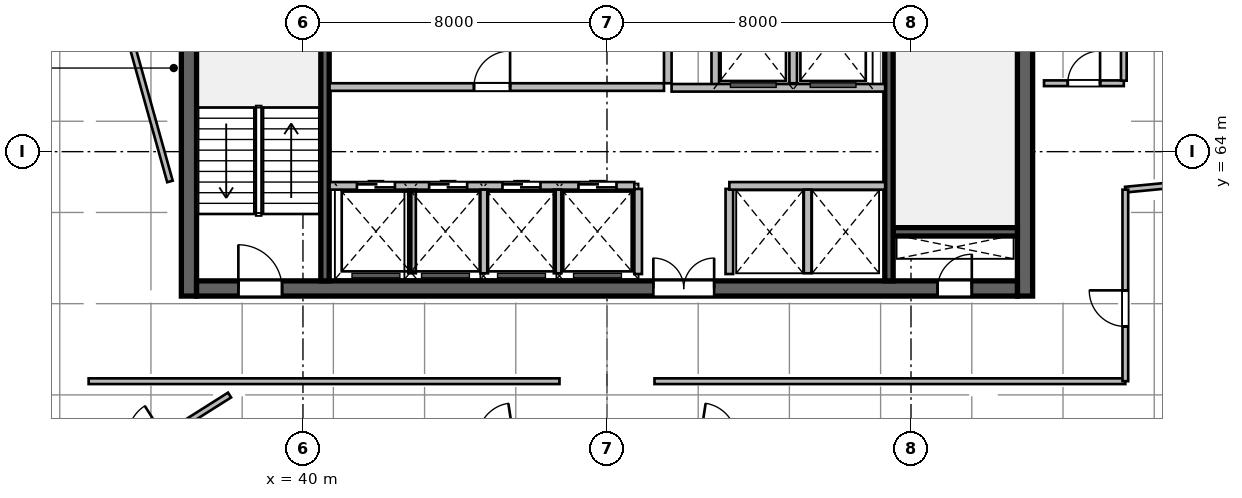
"""IFC4 building model, lengths in metres.
Left out: names, types, materials, properties, quantities, classifications, styles, units other than length and angle.
Written with IfcOpenShell. Run it as: python <this file> out.ifc"""

import sys

from ifc_helpers import new_model, si_unit, direction, frame, frame_2d, origin, place, context, subcontext, project, spatial, rectangle, extrude, source, transform, mapped, element, fill, save


model = new_model("IFC4")
c1 = context("Model", 3, precision=1e-05, world=origin(), true_north=direction((0.0, 1.0)))
c2 = subcontext(c1, "Body", "Model", "MODEL_VIEW")
j1 = project(units=[si_unit("LENGTHUNIT", "METRE"), si_unit("PLANEANGLEUNIT", "RADIAN")], contexts=[c1])
p1 = place(None, origin())
s1 = spatial("IfcSite", under=j1, at=p1, CompositionType="ELEMENT")
p2 = place(p1, origin())
s2 = spatial("IfcBuilding", under=s1, at=p2, CompositionType="ELEMENT")
p3 = place(p2, frame((0.0, 0.0, 275.7)))
s3 = spatial("IfcBuildingStorey", under=s2, at=p3, CompositionType="ELEMENT", Elevation=275.7)
m1 = source(origin(), c2, "Body", "SweptSolid", [
    extrude(rectangle(XDim=12.0, YDim=0.4, at=frame_2d((6.0, 0.0))), origin(), (0.0, 0.0, 1.0), 3.9),
])
for number, where, z_axis, x_axis in (
    (1, (37.0, 60.2, 0.0), (0.0, 0.0, 1.0), (0.0, 1.0, 0.0)),
    (2, (59.0, 60.2, 0.0), (0.0, 0.0, 1.0), (0.0, 1.0, 0.0)),
):
    element("IfcWall", number, at=place(p3, frame(where, z_axis=z_axis, x_axis=x_axis)), inside=s3, PredefinedType="SHEAR", context=c2, shape_type="MappedRepresentation", body=[
        mapped(m1, transform((0.0, 0.0, 0.0), scale=1.0)),
    ])
m2 = source(origin(), c2, "Body", "SweptSolid", [
    extrude(rectangle(XDim=21.6, YDim=0.4, at=frame_2d((10.8, 0.0))), origin(), (0.0, 0.0, 1.0), 3.9),
])
p4 = place(p3, frame((37.2, 60.4, 0.0), z_axis=(0.0, 0.0, 1.0), x_axis=(1.0, 0.0, 0.0)))
e3 = element("IfcWall", 3, at=p4, inside=s3, PredefinedType="SHEAR", context=c2, shape_type="MappedRepresentation", body=[
    mapped(m2, transform((0.0, 0.0, 0.0), scale=1.0)),
])
p5 = place(p4, frame((1.1, 0.0, 0.0)))
e4 = element("IfcOpeningElement", 4, at=p5, cuts=e3, PredefinedType="OPENING", context=c2, shape_type="SweptSolid", body=[
    extrude(rectangle(XDim=1.15, YDim=2.15, at=frame_2d((0.575, 1.075))), frame((0.0, 0.21, 0.0), z_axis=(0.0, -1.0, 0.0), x_axis=(1.0, 0.0, 0.0)), (0.0, 0.0, 1.0), 0.42),
])
p6 = place(p4, frame((19.5, 0.0, 0.0)))
e5 = element("IfcOpeningElement", 5, at=p6, cuts=e3, PredefinedType="OPENING", context=c2, shape_type="SweptSolid", body=[
    extrude(rectangle(XDim=0.9, YDim=2.1, at=frame_2d((0.45, 1.05))), frame((0.0, 0.21, 0.0), z_axis=(0.0, -1.0, 0.0), x_axis=(1.0, 0.0, 0.0)), (0.0, 0.0, 1.0), 0.42),
])
p7 = place(p4, frame((12.02, 0.0, 0.0)))
e6 = element("IfcOpeningElement", 6, at=p7, cuts=e3, PredefinedType="OPENING", context=c2, shape_type="SweptSolid", body=[
    extrude(rectangle(XDim=1.6, YDim=2.15, at=frame_2d((0.8, 1.075))), frame((0.0, 0.21, 0.0), z_axis=(0.0, -1.0, 0.0), x_axis=(1.0, 0.0, 0.0)), (0.0, 0.0, 1.0), 0.42),
])
m3 = source(origin(), c2, "Body", "SweptSolid", [
    extrude(rectangle(XDim=3.27, YDim=0.22, at=frame_2d((1.635, 0.0))), origin(), (0.0, 0.0, 1.0), 3.9),
])
p8 = place(p3, frame((55.53, 61.89, 0.0), z_axis=(0.0, 0.0, 1.0), x_axis=(1.0, 0.0, 0.0)))
e7 = element("IfcWall", 7, at=p8, inside=s3, PredefinedType="SHEAR", context=c2, shape_type="MappedRepresentation", body=[
    mapped(m3, transform((0.0, 0.0, 0.0), scale=1.0)),
])
m4 = source(origin(), c2, "Body", "SweptSolid", [
    extrude(rectangle(XDim=11.2, YDim=0.22, at=frame_2d((5.6, 0.0))), origin(), (0.0, 0.0, 1.0), 3.9),
])
p9 = place(p3, frame((40.58, 60.6, 0.0), z_axis=(0.0, 0.0, 1.0), x_axis=(0.0, 1.0, 0.0)))
e8 = element("IfcWall", 8, at=p9, inside=s3, PredefinedType="SHEAR", context=c2, shape_type="MappedRepresentation", body=[
    mapped(m4, transform((0.0, 0.0, 0.0), scale=1.0)),
])
p10 = place(p3, frame((55.42, 60.6, 0.0), z_axis=(0.0, 0.0, 1.0), x_axis=(0.0, 1.0, 0.0)))
e9 = element("IfcWall", 9, at=p10, inside=s3, PredefinedType="SHEAR", context=c2, shape_type="MappedRepresentation", body=[
    mapped(m4, transform((0.0, 0.0, 0.0), scale=1.0)),
])
p11 = place(p10, frame((9.645, 0.0, 0.0)))
e10 = element("IfcOpeningElement", 10, at=p11, cuts=e9, PredefinedType="OPENING", context=c2, shape_type="SweptSolid", body=[
    extrude(rectangle(XDim=1.15, YDim=2.15, at=frame_2d((0.575, 1.075))), frame((0.0, 0.12, 0.0), z_axis=(0.0, -1.0, 0.0), x_axis=(1.0, 0.0, 0.0)), (0.0, 0.0, 1.0), 0.24),
])
m5 = source(origin(), c2, "Body", "SweptSolid", [
    extrude(rectangle(XDim=2.24, YDim=0.2, at=frame_2d((1.12, 0.0))), origin(), (0.0, 0.0, 1.0), 3.64),
])
for number, where, z_axis, x_axis in (
    (11, (48.82, 60.78, 0.0), (0.0, 0.0, 1.0), (0.0, 1.0, 0.0)),
    (12, (51.22, 60.78, 0.0), (0.0, 0.0, 1.0), (0.0, 1.0, 0.0)),
):
    element("IfcWall", number, at=place(p3, frame(where, z_axis=z_axis, x_axis=x_axis)), inside=s3, PredefinedType="SOLIDWALL", context=c2, shape_type="MappedRepresentation", body=[
        mapped(m5, transform((0.0, 0.0, 0.0), scale=1.0)),
    ])
m6 = source(origin(), c2, "Body", "SweptSolid", [
    extrude(rectangle(XDim=5.8, YDim=0.2, at=frame_2d((2.9, 0.0))), origin(), (0.0, 0.0, 1.0), 3.64),
])
p12 = place(p3, frame((49.6, 65.8, 0.0), z_axis=(0.0, 0.0, 1.0), x_axis=(0.0, 1.0, 0.0)))
e13 = element("IfcWall", 13, at=p12, inside=s3, PredefinedType="SOLIDWALL", context=c2, shape_type="MappedRepresentation", body=[
    mapped(m6, transform((0.0, 0.0, 0.0), scale=1.0)),
])
m7 = source(origin(), c2, "Body", "SweptSolid", [
    extrude(rectangle(XDim=2.58, YDim=0.2, at=frame_2d((1.29, 0.0))), origin(), (0.0, 0.0, 1.0), 3.64),
])
p13 = place(p3, frame((50.85, 65.68, 0.0), z_axis=(0.0, 0.0, 1.0), x_axis=(0.0, 1.0, 0.0)))
e14 = element("IfcWall", 14, at=p13, inside=s3, PredefinedType="SOLIDWALL", context=c2, shape_type="MappedRepresentation", body=[
    mapped(m7, transform((0.0, 0.0, 0.0), scale=1.0)),
])
m8 = source(origin(), c2, "Body", "SweptSolid", [
    extrude(rectangle(XDim=2.4, YDim=0.2, at=frame_2d((1.2, 0.0))), origin(), (0.0, 0.0, 1.0), 3.64),
])
p14 = place(p3, frame((52.9, 65.8, 0.0), z_axis=(0.0, 0.0, 1.0), x_axis=(0.0, 1.0, 0.0)))
e15 = element("IfcWall", 15, at=p14, inside=s3, PredefinedType="SOLIDWALL", context=c2, shape_type="MappedRepresentation", body=[
    mapped(m8, transform((0.0, 0.0, 0.0), scale=1.0)),
])
m9 = source(origin(), c2, "Body", "SweptSolid", [
    extrude(rectangle(XDim=5.62, YDim=0.2, at=frame_2d((2.81, 0.0))), origin(), (0.0, 0.0, 1.0), 3.64),
])
p15 = place(p3, frame((49.7, 65.68, 0.0), z_axis=(0.0, 0.0, 1.0), x_axis=(1.0, 0.0, 0.0)))
e16 = element("IfcWall", 16, at=p15, inside=s3, PredefinedType="SOLIDWALL", context=c2, shape_type="MappedRepresentation", body=[
    mapped(m9, transform((0.0, 0.0, 0.0), scale=1.0)),
])
m10 = source(origin(), c2, "Body", "SweptSolid", [
    extrude(rectangle(XDim=8.02, YDim=0.2, at=frame_2d((4.01, 0.0))), origin(), (0.0, 0.0, 1.0), 3.64),
])
p16 = place(p3, frame((40.7, 63.1, 0.0), z_axis=(0.0, 0.0, 1.0), x_axis=(1.0, 0.0, 0.0)))
e17 = element("IfcWall", 17, at=p16, inside=s3, PredefinedType="SOLIDWALL", context=c2, shape_type="MappedRepresentation", body=[
    mapped(m10, transform((0.0, 0.0, 0.0), scale=1.0)),
])
p17 = place(p16, frame((0.72, 0.0, 0.0)))
e18 = element("IfcOpeningElement", 18, at=p17, cuts=e17, PredefinedType="OPENING", context=c2, shape_type="SweptSolid", body=[
    extrude(rectangle(XDim=1.0, YDim=2.15, at=frame_2d((0.5, 1.075))), frame((0.0, 0.11, 0.0), z_axis=(0.0, -1.0, 0.0), x_axis=(1.0, 0.0, 0.0)), (0.0, 0.0, 1.0), 0.22),
])
p18 = place(p16, frame((2.62, 0.0, 0.0)))
e19 = element("IfcOpeningElement", 19, at=p18, cuts=e17, PredefinedType="OPENING", context=c2, shape_type="SweptSolid", body=[
    extrude(rectangle(XDim=1.0, YDim=2.15, at=frame_2d((0.5, 1.075))), frame((0.0, 0.11, 0.0), z_axis=(0.0, -1.0, 0.0), x_axis=(1.0, 0.0, 0.0)), (0.0, 0.0, 1.0), 0.22),
])
p19 = place(p16, frame((4.55, 0.0, 0.0)))
e20 = element("IfcOpeningElement", 20, at=p19, cuts=e17, PredefinedType="OPENING", context=c2, shape_type="SweptSolid", body=[
    extrude(rectangle(XDim=1.0, YDim=2.15, at=frame_2d((0.5, 1.075))), frame((0.0, 0.11, 0.0), z_axis=(0.0, -1.0, 0.0), x_axis=(1.0, 0.0, 0.0)), (0.0, 0.0, 1.0), 0.22),
])
p20 = place(p16, frame((6.55, 0.0, 0.0)))
e21 = element("IfcOpeningElement", 21, at=p20, cuts=e17, PredefinedType="OPENING", context=c2, shape_type="SweptSolid", body=[
    extrude(rectangle(XDim=1.0, YDim=2.15, at=frame_2d((0.5, 1.075))), frame((0.0, 0.11, 0.0), z_axis=(0.0, -1.0, 0.0), x_axis=(1.0, 0.0, 0.0)), (0.0, 0.0, 1.0), 0.22),
])
m11 = source(origin(), c2, "Body", "SweptSolid", [
    extrude(rectangle(XDim=4.1, YDim=0.2, at=frame_2d((2.05, 0.0))), origin(), (0.0, 0.0, 1.0), 3.64),
])
p21 = place(p3, frame((51.22, 63.1, 0.0), z_axis=(0.0, 0.0, 1.0), x_axis=(1.0, 0.0, 0.0)))
e22 = element("IfcWall", 22, at=p21, inside=s3, PredefinedType="SOLIDWALL", context=c2, shape_type="MappedRepresentation", body=[
    mapped(m11, transform((0.0, 0.0, 0.0), scale=1.0)),
])
m12 = source(origin(), c2, "Body", "SweptSolid", [
    extrude(rectangle(XDim=2.2, YDim=0.2, at=frame_2d((1.1, 0.0))), origin(), (0.0, 0.0, 1.0), 3.64),
])
for number, where, z_axis, x_axis in (
    (23, (42.87, 60.8, 0.0), (0.0, 0.0, 1.0), (0.0, 1.0, 0.0)),
    (24, (44.77, 60.8, 0.0), (0.0, 0.0, 1.0), (0.0, 1.0, 0.0)),
    (25, (46.7, 60.8, 0.0), (0.0, 0.0, 1.0), (0.0, 1.0, 0.0)),
    (26, (53.28, 60.8, 0.0), (0.0, 0.0, 1.0), (0.0, 1.0, 0.0)),
):
    element("IfcWall", number, at=place(p3, frame(where, z_axis=z_axis, x_axis=x_axis)), inside=s3, PredefinedType="SOLIDWALL", context=c2, shape_type="MappedRepresentation", body=[
        mapped(m12, transform((0.0, 0.0, 0.0), scale=1.0)),
    ])
m13 = source(origin(), c2, "Body", "SweptSolid", [
    extrude(rectangle(XDim=8.8, YDim=0.2, at=frame_2d((4.4, 0.0))), origin(), (0.0, 0.0, 1.0), 3.64),
])
p22 = place(p3, frame((40.7, 65.7, 0.0), z_axis=(0.0, 0.0, 1.0), x_axis=(1.0, 0.0, 0.0)))
e27 = element("IfcWall", 27, at=p22, inside=s3, PredefinedType="SOLIDWALL", context=c2, shape_type="MappedRepresentation", body=[
    mapped(m13, transform((0.0, 0.0, 0.0), scale=1.0)),
])
p23 = place(p22, frame((3.8, 0.0, 0.0)))
e28 = element("IfcOpeningElement", 28, at=p23, cuts=e27, PredefinedType="OPENING", context=c2, shape_type="SweptSolid", body=[
    extrude(rectangle(XDim=0.95, YDim=2.15, at=frame_2d((0.475, 1.075))), frame((0.0, 0.11, 0.0), z_axis=(0.0, -1.0, 0.0), x_axis=(1.0, 0.0, 0.0)), (0.0, 0.0, 1.0), 0.22),
])
m14 = source(origin(), c2, "Body", "SweptSolid", [
    extrude(rectangle(XDim=2.1, YDim=0.15, at=frame_2d((1.05, 0.0))), origin(), (0.0, 0.0, 1.0), 3.64),
])
p24 = place(p3, frame((59.5, 65.8, 0.0), z_axis=(0.0, 0.0, 1.0), x_axis=(1.0, 0.0, 0.0)))
e29 = element("IfcWall", 29, at=p24, inside=s3, PredefinedType="PARTITIONING", context=c2, shape_type="MappedRepresentation", body=[
    mapped(m14, transform((0.0, 0.0, 0.0), scale=1.0)),
])
p25 = place(p24, frame((0.625, 0.0, 0.0)))
e30 = element("IfcOpeningElement", 30, at=p25, cuts=e29, PredefinedType="OPENING", context=c2, shape_type="SweptSolid", body=[
    extrude(rectangle(XDim=0.85, YDim=2.1, at=frame_2d((0.425, 1.05))), frame((0.0, 0.085, 0.0), z_axis=(0.0, -1.0, 0.0), x_axis=(1.0, 0.0, 0.0)), (0.0, 0.0, 1.0), 0.17),
])
m15 = source(origin(), c2, "Body", "SweptSolid", [
    extrude(rectangle(XDim=3.565, YDim=0.15, at=frame_2d((1.783, 0.0))), origin(), (0.0, 0.0, 1.0), 3.64),
])
p26 = place(p3, frame((61.6, 65.867, 0.0), z_axis=(0.0, 0.0, 1.0), x_axis=(0.0, 1.0, 0.0)))
e31 = element("IfcWall", 31, at=p26, inside=s3, PredefinedType="PARTITIONING", context=c2, shape_type="MappedRepresentation", body=[
    mapped(m15, transform((0.0, 0.0, 0.0), scale=1.0)),
])
p27 = place(p26, frame((0.88, 0.0, 0.0)))
e32 = element("IfcOpeningElement", 32, at=p27, cuts=e31, PredefinedType="OPENING", context=c2, shape_type="SweptSolid", body=[
    extrude(rectangle(XDim=0.95, YDim=2.1, at=frame_2d((0.475, 1.05))), frame((0.0, 0.085, 0.0), z_axis=(0.0, -1.0, 0.0), x_axis=(1.0, 0.0, 0.0)), (0.0, 0.0, 1.0), 0.17),
])
m16 = source(origin(), c2, "Body", "SweptSolid", [
    extrude(rectangle(XDim=17.556, YDim=0.15, at=frame_2d((8.778, 0.0))), origin(), (0.0, 0.0, 1.0), 3.64),
])
p28 = place(p3, frame((33.8, 54.958, 0.0), z_axis=(0.0, 0.0, 1.0), x_axis=(-0.395687598313, 0.918385172213, 0.0)))
e33 = element("IfcWall", 33, at=p28, inside=s3, PredefinedType="PARTITIONING", context=c2, shape_type="MappedRepresentation", body=[
    mapped(m16, transform((0.0, 0.0, 0.0), scale=1.0)),
])
m17 = source(origin(), c2, "Body", "SweptSolid", [
    extrude(rectangle(XDim=5.025, YDim=0.15, at=frame_2d((2.513, 0.0))), origin(), (0.0, 0.0, 1.0), 3.64),
])
p29 = place(p3, frame((33.82, 54.911, 0.0), z_axis=(0.0, 0.0, 1.0), x_axis=(0.84532378062, 0.534254345717, 0.0)))
e34 = element("IfcWall", 34, at=p29, inside=s3, PredefinedType="PARTITIONING", context=c2, shape_type="MappedRepresentation", body=[
    mapped(m17, transform((0.0, 0.0, 0.0), scale=1.0)),
])
p30 = place(p29, frame((2.038, 0.0, 0.0)))
e35 = element("IfcOpeningElement", 35, at=p30, cuts=e34, PredefinedType="OPENING", context=c2, shape_type="SweptSolid", body=[
    extrude(rectangle(XDim=0.95, YDim=2.1, at=frame_2d((0.475, 1.05))), frame((0.0, 0.085, 0.0), z_axis=(0.0, -1.0, 0.0), x_axis=(1.0, 0.0, 0.0)), (0.0, 0.0, 1.0), 0.17),
])
m18 = source(origin(), c2, "Body", "SweptSolid", [
    extrude(rectangle(XDim=12.311, YDim=0.15, at=frame_2d((6.155, 0.0))), origin(), (0.0, 0.0, 1.0), 3.64),
])
p31 = place(p3, frame((36.5, 63.216, 0.0), z_axis=(0.0, 0.0, 1.0), x_axis=(-0.268759602651, 0.963207286093, 0.0)))
e36 = element("IfcWall", 36, at=p31, inside=s3, PredefinedType="PARTITIONING", context=c2, shape_type="MappedRepresentation", body=[
    mapped(m18, transform((0.0, 0.0, 0.0), scale=1.0)),
])
m19 = source(origin(), c2, "Body", "SweptSolid", [
    extrude(rectangle(XDim=12.39, YDim=0.15, at=frame_2d((6.195, 0.0))), origin(), (0.0, 0.0, 1.0), 3.27),
])
for number, where, z_axis, x_axis in (
    (37, (34.36, 57.96, 0.0), (0.0, 0.0, 1.0), (1.0, 0.0, 0.0)),
    (38, (49.25, 57.96, 0.0), (0.0, 0.0, 1.0), (1.0, 0.0, 0.0)),
):
    element("IfcWall", number, at=place(p3, frame(where, z_axis=z_axis, x_axis=x_axis)), inside=s3, PredefinedType="PARTITIONING", context=c2, shape_type="MappedRepresentation", body=[
        mapped(m19, transform((0.0, 0.0, 0.0), scale=1.0)),
    ])
m20 = source(origin(), c2, "Body", "SweptSolid", [
    extrude(rectangle(XDim=11.79, YDim=0.15, at=frame_2d((5.895, 0.0))), origin(), (0.0, 0.0, 1.0), 3.64),
])
p32 = place(p3, frame((61.64, 63.0, 0.0), z_axis=(0.0, 0.0, 1.0), x_axis=(0.995363389039, 0.096185881295, 0.0)))
e39 = element("IfcWall", 39, at=p32, inside=s3, PredefinedType="PARTITIONING", context=c2, shape_type="MappedRepresentation", body=[
    mapped(m20, transform((0.0, 0.0, 0.0), scale=1.0)),
])
m21 = source(origin(), c2, "Body", "SweptSolid", [
    extrude(rectangle(XDim=5.04, YDim=0.15, at=frame_2d((2.52, 0.0))), origin(), (0.0, 0.0, 1.0), 3.64),
])
p33 = place(p3, frame((61.64, 57.96, 0.0), z_axis=(0.0, 0.0, 1.0), x_axis=(0.0, 1.0, 0.0)))
e40 = element("IfcWall", 40, at=p33, inside=s3, PredefinedType="PARTITIONING", context=c2, shape_type="MappedRepresentation", body=[
    mapped(m21, transform((0.0, 0.0, 0.0), scale=1.0)),
])
p34 = place(p33, frame((1.44, 0.0, 0.0)))
e41 = element("IfcOpeningElement", 41, at=p34, cuts=e40, PredefinedType="OPENING", context=c2, shape_type="SweptSolid", body=[
    extrude(rectangle(XDim=0.95, YDim=2.1, at=frame_2d((0.475, 1.05))), frame((0.0, 0.085, 0.0), z_axis=(0.0, -1.0, 0.0), x_axis=(1.0, 0.0, 0.0)), (0.0, 0.0, 1.0), 0.17),
])
m22 = source(origin(), c2, "Body", "SweptSolid", [
    extrude(rectangle(XDim=1.15, YDim=2.15, at=frame_2d((0.575, 1.075))), frame((0.0, 0.025, 0.0), z_axis=(0.0, -1.0, 0.0), x_axis=(1.0, 0.0, 0.0)), (0.0, 0.0, 1.0), 0.05),
])
p35 = place(p5, origin())
e42 = element("IfcDoor", 42, at=p35, inside=s3, OperationType="SINGLE_SWING_LEFT", PredefinedType="DOOR", context=c2, shape_type="MappedRepresentation", body=[
    mapped(m22, transform((0.0, 0.0, 0.0), scale=1.0)),
])
fill(e4, e42)
m23 = source(origin(), c2, "Body", "SweptSolid", [
    extrude(rectangle(XDim=0.9, YDim=2.1, at=frame_2d((0.45, 1.05))), frame((0.0, 0.025, 0.0), z_axis=(0.0, -1.0, 0.0), x_axis=(1.0, 0.0, 0.0)), (0.0, 0.0, 1.0), 0.05),
])
p36 = place(p6, origin())
e43 = element("IfcDoor", 43, at=p36, inside=s3, OperationType="SINGLE_SWING_RIGHT", PredefinedType="DOOR", context=c2, shape_type="MappedRepresentation", body=[
    mapped(m23, transform((0.0, 0.0, 0.0), scale=1.0)),
])
fill(e5, e43)
m24 = source(origin(), c2, "Body", "SweptSolid", [
    extrude(rectangle(XDim=1.6, YDim=2.15, at=frame_2d((0.8, 1.075))), frame((0.0, 0.025, 0.0), z_axis=(0.0, -1.0, 0.0), x_axis=(1.0, 0.0, 0.0)), (0.0, 0.0, 1.0), 0.05),
])
p37 = place(p7, origin())
e44 = element("IfcDoor", 44, at=p37, inside=s3, OperationType="DOUBLE_DOOR_SINGLE_SWING", PredefinedType="DOOR", context=c2, shape_type="MappedRepresentation", body=[
    mapped(m24, transform((0.0, 0.0, 0.0), scale=1.0)),
])
fill(e6, e44)
m25 = source(origin(), c2, "Body", "SweptSolid", [
    extrude(rectangle(XDim=1.0, YDim=2.15, at=frame_2d((0.5, 1.075))), frame((0.0, 0.025, 0.0), z_axis=(0.0, -1.0, 0.0), x_axis=(1.0, 0.0, 0.0)), (0.0, 0.0, 1.0), 0.05),
])
p38 = place(p17, origin())
e45 = element("IfcDoor", 45, at=p38, inside=s3, OperationType="DOUBLE_DOOR_SLIDING", PredefinedType="DOOR", context=c2, shape_type="MappedRepresentation", body=[
    mapped(m25, transform((0.0, 0.0, 0.0), scale=1.0)),
])
fill(e18, e45)
p39 = place(p18, origin())
e46 = element("IfcDoor", 46, at=p39, inside=s3, OperationType="DOUBLE_DOOR_SLIDING", PredefinedType="DOOR", context=c2, shape_type="MappedRepresentation", body=[
    mapped(m25, transform((0.0, 0.0, 0.0), scale=1.0)),
])
fill(e19, e46)
p40 = place(p19, origin())
e47 = element("IfcDoor", 47, at=p40, inside=s3, OperationType="DOUBLE_DOOR_SLIDING", PredefinedType="DOOR", context=c2, shape_type="MappedRepresentation", body=[
    mapped(m25, transform((0.0, 0.0, 0.0), scale=1.0)),
])
fill(e20, e47)
p41 = place(p20, origin())
e48 = element("IfcDoor", 48, at=p41, inside=s3, OperationType="DOUBLE_DOOR_SLIDING", PredefinedType="DOOR", context=c2, shape_type="MappedRepresentation", body=[
    mapped(m25, transform((0.0, 0.0, 0.0), scale=1.0)),
])
fill(e21, e48)
m26 = source(origin(), c2, "Body", "SweptSolid", [
    extrude(rectangle(XDim=0.95, YDim=2.15, at=frame_2d((0.475, 1.075))), frame((0.0, 0.025, 0.0), z_axis=(0.0, -1.0, 0.0), x_axis=(1.0, 0.0, 0.0)), (0.0, 0.0, 1.0), 0.05),
])
p42 = place(p23, origin())
e49 = element("IfcDoor", 49, at=p42, inside=s3, OperationType="SINGLE_SWING_RIGHT", PredefinedType="DOOR", context=c2, shape_type="MappedRepresentation", body=[
    mapped(m26, transform((0.0, 0.0, 0.0), scale=1.0)),
])
fill(e28, e49)
m27 = source(origin(), c2, "Body", "SweptSolid", [
    extrude(rectangle(XDim=0.85, YDim=2.1, at=frame_2d((0.425, 1.05))), frame((0.0, 0.025, 0.0), z_axis=(0.0, -1.0, 0.0), x_axis=(1.0, 0.0, 0.0)), (0.0, 0.0, 1.0), 0.05),
])
p43 = place(p25, origin())
e50 = element("IfcDoor", 50, at=p43, inside=s3, OperationType="SINGLE_SWING_RIGHT", PredefinedType="DOOR", context=c2, shape_type="MappedRepresentation", body=[
    mapped(m27, transform((0.0, 0.0, 0.0), scale=1.0)),
])
fill(e30, e50)
m28 = source(origin(), c2, "Body", "SweptSolid", [
    extrude(rectangle(XDim=0.95, YDim=2.1, at=frame_2d((0.475, 1.05))), frame((0.0, 0.025, 0.0), z_axis=(0.0, -1.0, 0.0), x_axis=(1.0, 0.0, 0.0)), (0.0, 0.0, 1.0), 0.05),
])
p44 = place(p34, origin())
e51 = element("IfcDoor", 51, at=p44, inside=s3, OperationType="SINGLE_SWING_RIGHT", PredefinedType="DOOR", context=c2, shape_type="MappedRepresentation", body=[
    mapped(m28, transform((0.0, 0.0, 0.0), scale=1.0)),
])
fill(e41, e51)
save(model, sys.argv[1])
